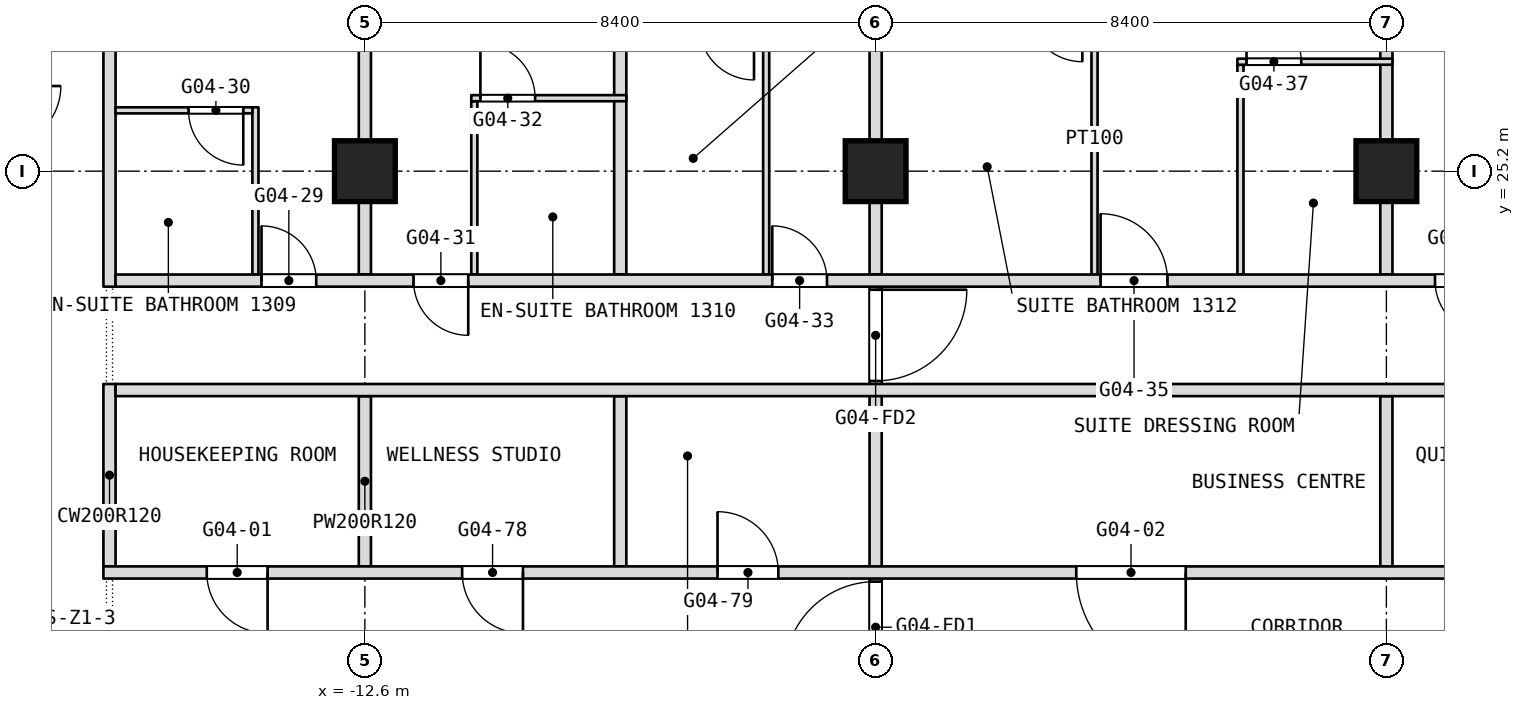
"""IFC4 building model, lengths in metres.
Left out: names, types, materials, properties, quantities, classifications, styles, units other than length and angle.
Written with IfcOpenShell. Run it as: python <this file> out.ifc"""

import sys

from ifc_helpers import new_model, si_unit, direction, frame, frame_2d, origin, origin_2d, place, context, subcontext, project, spatial, rectangle, extrude, element, fill, save


model = new_model("IFC4")
c1 = context("Model", 3, precision=1e-05, world=origin(), true_north=direction((0.0, 1.0)))
c2 = subcontext(c1, "Body", "Model", "MODEL_VIEW")
j1 = project(units=[si_unit("LENGTHUNIT", "METRE"), si_unit("PLANEANGLEUNIT", "RADIAN")], contexts=[c1])
p1 = place(None, origin())
s1 = spatial("IfcSite", under=j1, at=p1, CompositionType="ELEMENT")
p2 = place(p1, origin())
s2 = spatial("IfcBuilding", under=s1, at=p2, CompositionType="ELEMENT")
p3 = place(p2, frame((0.0, 0.0, 61.7)))
s3 = spatial("IfcBuildingStorey", under=s2, at=p3, CompositionType="ELEMENT", Elevation=61.7)
for number, where, z_axis, x_axis in (
    (1, (-12.6, 25.2, 0.0), (0.0, 0.0, 1.0), (1.0, 0.0, 0.0)),
    (2, (-4.2, 25.2, 0.0), (0.0, 0.0, 1.0), (1.0, 0.0, 0.0)),
    (3, (4.2, 25.2, 0.0), (0.0, 0.0, 1.0), (1.0, 0.0, 0.0)),
):
    element("IfcColumn", number, at=place(p3, frame(where, z_axis=z_axis, x_axis=x_axis)), inside=s3, PredefinedType="COLUMN", context=c2, shape_type="SweptSolid", body=[
        extrude(rectangle(XDim=1.0, YDim=1.0, at=origin_2d()), origin(), (0.0, 0.0, 1.0), 3.6),
    ])
p4 = place(p3, frame((4.2, 18.7, 0.0), z_axis=(0.0, 0.0, 1.0), x_axis=(0.0, 1.0, 0.0)))
e4 = element("IfcWall", 4, at=p4, inside=s3, PredefinedType="PARTITIONING", context=c2, shape_type="SweptSolid", body=[
    extrude(rectangle(XDim=2.8, YDim=0.2, at=frame_2d((1.4, 0.0))), origin(), (0.0, 0.0, 1.0), 3.34),
])
p5 = place(p3, frame((4.2, 23.5, 0.0), z_axis=(0.0, 0.0, 1.0), x_axis=(0.0, 1.0, 0.0)))
e5 = element("IfcWall", 5, at=p5, inside=s3, PredefinedType="PARTITIONING", context=c2, shape_type="SweptSolid", body=[
    extrude(rectangle(XDim=10.04, YDim=0.2, at=frame_2d((5.02, 0.0))), origin(), (0.0, 0.0, 1.0), 3.34),
])
p6 = place(p3, frame((1.8, 23.5, 0.0), z_axis=(0.0, 0.0, 1.0), x_axis=(0.0, 1.0, 0.0)))
e6 = element("IfcWall", 6, at=p6, inside=s3, PredefinedType="PARTITIONING", context=c2, shape_type="SweptSolid", body=[
    extrude(rectangle(XDim=3.45, YDim=0.1, at=frame_2d((1.725, 0.0))), origin(), (0.0, 0.0, 1.0), 3.34),
])
p7 = place(p3, frame((-0.6, 23.5, 0.0), z_axis=(0.0, 0.0, 1.0), x_axis=(0.0, 1.0, 0.0)))
e7 = element("IfcWall", 7, at=p7, inside=s3, PredefinedType="PARTITIONING", context=c2, shape_type="SweptSolid", body=[
    extrude(rectangle(XDim=4.45, YDim=0.1, at=frame_2d((2.225, 0.0))), origin(), (0.0, 0.0, 1.0), 3.34),
])
p8 = place(p3, frame((-4.2, 16.8, 0.0), z_axis=(0.0, 0.0, 1.0), x_axis=(0.0, 1.0, 0.0)))
e8 = element("IfcWall", 8, at=p8, inside=s3, PredefinedType="PARTITIONING", context=c2, shape_type="SweptSolid", body=[
    extrude(rectangle(XDim=6.7, YDim=0.2, at=frame_2d((3.35, 0.0))), origin(), (0.0, 0.0, 1.0), 3.34),
])
p9 = place(p8, frame((0.15, 0.0, 0.0)))
e9 = element("IfcOpeningElement", 9, at=p9, cuts=e8, PredefinedType="OPENING", context=c2, shape_type="SweptSolid", body=[
    extrude(rectangle(XDim=1.5, YDim=2.1, at=frame_2d((0.75, 1.05))), frame((0.0, 0.1, 0.0), z_axis=(0.0, -1.0, 0.0), x_axis=(1.0, 0.0, 0.0)), (0.0, 0.0, 1.0), 0.2),
])
p10 = place(p8, frame((4.95, 0.0, 0.0)))
e10 = element("IfcOpeningElement", 10, at=p10, cuts=e8, PredefinedType="OPENING", context=c2, shape_type="SweptSolid", body=[
    extrude(rectangle(XDim=1.5, YDim=2.1, at=frame_2d((0.75, 1.05))), frame((0.0, 0.1, 0.0), z_axis=(0.0, -1.0, 0.0), x_axis=(1.0, 0.0, 0.0)), (0.0, 0.0, 1.0), 0.2),
])
p11 = place(p3, frame((-4.2, 23.5, 0.0), z_axis=(0.0, 0.0, 1.0), x_axis=(0.0, 1.0, 0.0)))
e11 = element("IfcWall", 11, at=p11, inside=s3, PredefinedType="PARTITIONING", context=c2, shape_type="SweptSolid", body=[
    extrude(rectangle(XDim=10.04, YDim=0.2, at=frame_2d((5.02, 0.0))), origin(), (0.0, 0.0, 1.0), 3.34),
])
p12 = place(p3, frame((-6.0, 23.5, 0.0), z_axis=(0.0, 0.0, 1.0), x_axis=(0.0, 1.0, 0.0)))
e12 = element("IfcWall", 12, at=p12, inside=s3, PredefinedType="PARTITIONING", context=c2, shape_type="SweptSolid", body=[
    extrude(rectangle(XDim=4.15, YDim=0.1, at=frame_2d((2.075, 0.0))), origin(), (0.0, 0.0, 1.0), 3.34),
])
p13 = place(p3, frame((-8.4, 18.7, 0.0), z_axis=(0.0, 0.0, 1.0), x_axis=(0.0, 1.0, 0.0)))
e13 = element("IfcWall", 13, at=p13, inside=s3, PredefinedType="PARTITIONING", context=c2, shape_type="SweptSolid", body=[
    extrude(rectangle(XDim=2.8, YDim=0.2, at=frame_2d((1.4, 0.0))), origin(), (0.0, 0.0, 1.0), 3.34),
])
p14 = place(p3, frame((-8.4, 23.5, 0.0), z_axis=(0.0, 0.0, 1.0), x_axis=(0.0, 1.0, 0.0)))
e14 = element("IfcWall", 14, at=p14, inside=s3, PredefinedType="PARTITIONING", context=c2, shape_type="SweptSolid", body=[
    extrude(rectangle(XDim=10.04, YDim=0.2, at=frame_2d((5.02, 0.0))), origin(), (0.0, 0.0, 1.0), 3.34),
])
p15 = place(p3, frame((-10.8, 23.5, 0.0), z_axis=(0.0, 0.0, 1.0), x_axis=(0.0, 1.0, 0.0)))
e15 = element("IfcWall", 15, at=p15, inside=s3, PredefinedType="PARTITIONING", context=c2, shape_type="SweptSolid", body=[
    extrude(rectangle(XDim=2.85, YDim=0.1, at=frame_2d((1.425, 0.0))), origin(), (0.0, 0.0, 1.0), 3.34),
])
p16 = place(p3, frame((-12.6, 18.7, 0.0), z_axis=(0.0, 0.0, 1.0), x_axis=(0.0, 1.0, 0.0)))
e16 = element("IfcWall", 16, at=p16, inside=s3, PredefinedType="PARTITIONING", context=c2, shape_type="SweptSolid", body=[
    extrude(rectangle(XDim=2.8, YDim=0.2, at=frame_2d((1.4, 0.0))), origin(), (0.0, 0.0, 1.0), 3.34),
])
p17 = place(p3, frame((-12.6, 23.5, 0.0), z_axis=(0.0, 0.0, 1.0), x_axis=(0.0, 1.0, 0.0)))
e17 = element("IfcWall", 17, at=p17, inside=s3, PredefinedType="PARTITIONING", context=c2, shape_type="SweptSolid", body=[
    extrude(rectangle(XDim=10.04, YDim=0.2, at=frame_2d((5.02, 0.0))), origin(), (0.0, 0.0, 1.0), 3.34),
])
p18 = place(p3, frame((-14.4, 23.5, 0.0), z_axis=(0.0, 0.0, 1.0), x_axis=(0.0, 1.0, 0.0)))
e18 = element("IfcWall", 18, at=p18, inside=s3, PredefinedType="PARTITIONING", context=c2, shape_type="SweptSolid", body=[
    extrude(rectangle(XDim=2.75, YDim=0.1, at=frame_2d((1.375, 0.0))), origin(), (0.0, 0.0, 1.0), 3.34),
])
p19 = place(p3, frame((-16.8, 18.7, 0.0), z_axis=(0.0, 0.0, 1.0), x_axis=(0.0, 1.0, 0.0)))
e19 = element("IfcWall", 19, at=p19, inside=s3, PredefinedType="PARTITIONING", context=c2, shape_type="SweptSolid", body=[
    extrude(rectangle(XDim=3.0, YDim=0.2, at=frame_2d((1.5, 0.0))), origin(), (0.0, 0.0, 1.0), 3.34),
])
p20 = place(p3, frame((-16.8, 23.3, 0.0), z_axis=(0.0, 0.0, 1.0), x_axis=(0.0, 1.0, 0.0)))
e20 = element("IfcWall", 20, at=p20, inside=s3, PredefinedType="PARTITIONING", context=c2, shape_type="SweptSolid", body=[
    extrude(rectangle(XDim=10.24, YDim=0.2, at=frame_2d((5.12, 0.0))), origin(), (0.0, 0.0, 1.0), 3.34),
])
p21 = place(p3, frame((-16.9, 18.6, 0.0), z_axis=(0.0, 0.0, 1.0), x_axis=(1.0, 0.0, 0.0)))
e21 = element("IfcWall", 21, at=p21, inside=s3, PredefinedType="PARTITIONING", context=c2, shape_type="SweptSolid", body=[
    extrude(rectangle(XDim=25.1, YDim=0.2, at=frame_2d((12.55, 0.0))), origin(), (0.0, 0.0, 1.0), 3.34),
])
p22 = place(p21, frame((1.7, 0.0, 0.0)))
e22 = element("IfcOpeningElement", 22, at=p22, cuts=e21, PredefinedType="OPENING", context=c2, shape_type="SweptSolid", body=[
    extrude(rectangle(XDim=1.0, YDim=2.1, at=frame_2d((0.5, 1.05))), frame((0.0, 0.1, 0.0), z_axis=(0.0, -1.0, 0.0), x_axis=(1.0, 0.0, 0.0)), (0.0, 0.0, 1.0), 0.2),
])
p23 = place(p21, frame((16.0, 0.0, 0.0)))
e23 = element("IfcOpeningElement", 23, at=p23, cuts=e21, PredefinedType="OPENING", context=c2, shape_type="SweptSolid", body=[
    extrude(rectangle(XDim=1.8, YDim=2.1, at=frame_2d((0.9, 1.05))), frame((0.0, 0.1, 0.0), z_axis=(0.0, -1.0, 0.0), x_axis=(1.0, 0.0, 0.0)), (0.0, 0.0, 1.0), 0.2),
])
p24 = place(p21, frame((22.55, 0.0, 0.0)))
e24 = element("IfcOpeningElement", 24, at=p24, cuts=e21, PredefinedType="OPENING", context=c2, shape_type="SweptSolid", body=[
    extrude(rectangle(XDim=1.0, YDim=2.1, at=frame_2d((0.5, 1.05))), frame((0.0, 0.1, 0.0), z_axis=(0.0, -1.0, 0.0), x_axis=(1.0, 0.0, 0.0)), (0.0, 0.0, 1.0), 0.2),
])
p25 = place(p21, frame((5.9, 0.0, 0.0)))
e25 = element("IfcOpeningElement", 25, at=p25, cuts=e21, PredefinedType="OPENING", context=c2, shape_type="SweptSolid", body=[
    extrude(rectangle(XDim=1.0, YDim=2.1, at=frame_2d((0.5, 1.05))), frame((0.0, 0.1, 0.0), z_axis=(0.0, -1.0, 0.0), x_axis=(1.0, 0.0, 0.0)), (0.0, 0.0, 1.0), 0.2),
])
p26 = place(p21, frame((10.1, 0.0, 0.0)))
e26 = element("IfcOpeningElement", 26, at=p26, cuts=e21, PredefinedType="OPENING", context=c2, shape_type="SweptSolid", body=[
    extrude(rectangle(XDim=1.0, YDim=2.1, at=frame_2d((0.5, 1.05))), frame((0.0, 0.1, 0.0), z_axis=(0.0, -1.0, 0.0), x_axis=(1.0, 0.0, 0.0)), (0.0, 0.0, 1.0), 0.2),
])
p27 = place(p3, frame((-16.7, 21.6, 0.0), z_axis=(0.0, 0.0, 1.0), x_axis=(1.0, 0.0, 0.0)))
e27 = element("IfcWall", 27, at=p27, inside=s3, PredefinedType="PARTITIONING", context=c2, shape_type="SweptSolid", body=[
    extrude(rectangle(XDim=24.9, YDim=0.2, at=frame_2d((12.45, 0.0))), origin(), (0.0, 0.0, 1.0), 3.34),
])
p28 = place(p3, frame((-16.7, 23.4, 0.0), z_axis=(0.0, 0.0, 1.0), x_axis=(1.0, 0.0, 0.0)))
e28 = element("IfcWall", 28, at=p28, inside=s3, PredefinedType="PARTITIONING", context=c2, shape_type="SweptSolid", body=[
    extrude(rectangle(XDim=23.4, YDim=0.2, at=frame_2d((11.7, 0.0))), origin(), (0.0, 0.0, 1.0), 3.34),
])
p29 = place(p28, frame((2.4, 0.0, 0.0)))
e29 = element("IfcOpeningElement", 29, at=p29, cuts=e28, PredefinedType="OPENING", context=c2, shape_type="SweptSolid", body=[
    extrude(rectangle(XDim=0.9, YDim=2.1, at=frame_2d((0.45, 1.05))), frame((0.0, 0.1, 0.0), z_axis=(0.0, -1.0, 0.0), x_axis=(1.0, 0.0, 0.0)), (0.0, 0.0, 1.0), 0.2),
])
p30 = place(p28, frame((4.9, 0.0, 0.0)))
e30 = element("IfcOpeningElement", 30, at=p30, cuts=e28, PredefinedType="OPENING", context=c2, shape_type="SweptSolid", body=[
    extrude(rectangle(XDim=0.9, YDim=2.1, at=frame_2d((0.45, 1.05))), frame((0.0, 0.1, 0.0), z_axis=(0.0, -1.0, 0.0), x_axis=(1.0, 0.0, 0.0)), (0.0, 0.0, 1.0), 0.2),
])
p31 = place(p28, frame((10.8, 0.0, 0.0)))
e31 = element("IfcOpeningElement", 31, at=p31, cuts=e28, PredefinedType="OPENING", context=c2, shape_type="SweptSolid", body=[
    extrude(rectangle(XDim=0.9, YDim=2.1, at=frame_2d((0.45, 1.05))), frame((0.0, 0.1, 0.0), z_axis=(0.0, -1.0, 0.0), x_axis=(1.0, 0.0, 0.0)), (0.0, 0.0, 1.0), 0.2),
])
p32 = place(p28, frame((16.2, 0.0, 0.0)))
e32 = element("IfcOpeningElement", 32, at=p32, cuts=e28, PredefinedType="OPENING", context=c2, shape_type="SweptSolid", body=[
    extrude(rectangle(XDim=1.1, YDim=2.1, at=frame_2d((0.55, 1.05))), frame((0.0, 0.1, 0.0), z_axis=(0.0, -1.0, 0.0), x_axis=(1.0, 0.0, 0.0)), (0.0, 0.0, 1.0), 0.2),
])
p33 = place(p28, frame((21.7, 0.0, 0.0)))
e33 = element("IfcOpeningElement", 33, at=p33, cuts=e28, PredefinedType="OPENING", context=c2, shape_type="SweptSolid", body=[
    extrude(rectangle(XDim=0.9, YDim=2.1, at=frame_2d((0.45, 1.05))), frame((0.0, 0.1, 0.0), z_axis=(0.0, -1.0, 0.0), x_axis=(1.0, 0.0, 0.0)), (0.0, 0.0, 1.0), 0.2),
])
p34 = place(p3, frame((-16.7, 26.2, 0.0), z_axis=(0.0, 0.0, 1.0), x_axis=(1.0, 0.0, 0.0)))
e34 = element("IfcWall", 34, at=p34, inside=s3, PredefinedType="PARTITIONING", context=c2, shape_type="SweptSolid", body=[
    extrude(rectangle(XDim=2.25, YDim=0.1, at=frame_2d((1.125, 0.0))), origin(), (0.0, 0.0, 1.0), 3.34),
])
p35 = place(p34, frame((1.2, 0.0, 0.0)))
e35 = element("IfcOpeningElement", 35, at=p35, cuts=e34, PredefinedType="OPENING", context=c2, shape_type="SweptSolid", body=[
    extrude(rectangle(XDim=0.9, YDim=2.1, at=frame_2d((0.45, 1.05))), frame((0.0, 0.05, 0.0), z_axis=(0.0, -1.0, 0.0), x_axis=(1.0, 0.0, 0.0)), (0.0, 0.0, 1.0), 0.1),
])
p36 = place(p3, frame((-10.85, 26.4, 0.0), z_axis=(0.0, 0.0, 1.0), x_axis=(1.0, 0.0, 0.0)))
e36 = element("IfcWall", 36, at=p36, inside=s3, PredefinedType="PARTITIONING", context=c2, shape_type="SweptSolid", body=[
    extrude(rectangle(XDim=2.55, YDim=0.1, at=frame_2d((1.275, 0.0))), origin(), (0.0, 0.0, 1.0), 3.34),
])
p37 = place(p36, frame((0.15, 0.0, 0.0)))
e37 = element("IfcOpeningElement", 37, at=p37, cuts=e36, PredefinedType="OPENING", context=c2, shape_type="SweptSolid", body=[
    extrude(rectangle(XDim=0.9, YDim=2.1, at=frame_2d((0.45, 1.05))), frame((0.0, 0.05, 0.0), z_axis=(0.0, -1.0, 0.0), x_axis=(1.0, 0.0, 0.0)), (0.0, 0.0, 1.0), 0.1),
])
p38 = place(p3, frame((1.75, 27.0, 0.0), z_axis=(0.0, 0.0, 1.0), x_axis=(1.0, 0.0, 0.0)))
e38 = element("IfcWall", 38, at=p38, inside=s3, PredefinedType="PARTITIONING", context=c2, shape_type="SweptSolid", body=[
    extrude(rectangle(XDim=2.55, YDim=0.1, at=frame_2d((1.275, 0.0))), origin(), (0.0, 0.0, 1.0), 3.34),
])
p39 = place(p38, frame((0.15, 0.0, 0.0)))
e39 = element("IfcOpeningElement", 39, at=p39, cuts=e38, PredefinedType="OPENING", context=c2, shape_type="SweptSolid", body=[
    extrude(rectangle(XDim=0.9, YDim=2.1, at=frame_2d((0.45, 1.05))), frame((0.0, 0.05, 0.0), z_axis=(0.0, -1.0, 0.0), x_axis=(1.0, 0.0, 0.0)), (0.0, 0.0, 1.0), 0.1),
])
p40 = place(p22, origin())
e40 = element("IfcDoor", 40, at=p40, inside=s3, OperationType="SINGLE_SWING_RIGHT", PredefinedType="DOOR", context=c2, shape_type="SweptSolid", body=[
    extrude(rectangle(XDim=1.0, YDim=2.1, at=frame_2d((0.5, 1.05))), frame((0.0, 0.025, 0.0), z_axis=(0.0, -1.0, 0.0), x_axis=(1.0, 0.0, 0.0)), (0.0, 0.0, 1.0), 0.05),
])
fill(e22, e40)
p41 = place(p23, origin())
e41 = element("IfcDoor", 41, at=p41, inside=s3, OperationType="DOUBLE_DOOR_SINGLE_SWING", PredefinedType="DOOR", context=c2, shape_type="SweptSolid", body=[
    extrude(rectangle(XDim=1.8, YDim=2.1, at=frame_2d((0.9, 1.05))), frame((0.0, 0.025, 0.0), z_axis=(0.0, -1.0, 0.0), x_axis=(1.0, 0.0, 0.0)), (0.0, 0.0, 1.0), 0.05),
])
fill(e23, e41)
p42 = place(p25, origin())
e42 = element("IfcDoor", 42, at=p42, inside=s3, OperationType="SINGLE_SWING_RIGHT", PredefinedType="DOOR", context=c2, shape_type="SweptSolid", body=[
    extrude(rectangle(XDim=1.0, YDim=2.1, at=frame_2d((0.5, 1.05))), frame((0.0, 0.025, 0.0), z_axis=(0.0, -1.0, 0.0), x_axis=(1.0, 0.0, 0.0)), (0.0, 0.0, 1.0), 0.05),
])
fill(e25, e42)
p43 = place(p26, origin())
e43 = element("IfcDoor", 43, at=p43, inside=s3, OperationType="SINGLE_SWING_LEFT", PredefinedType="DOOR", context=c2, shape_type="SweptSolid", body=[
    extrude(rectangle(XDim=1.0, YDim=2.1, at=frame_2d((0.5, 1.05))), frame((0.0, 0.025, 0.0), z_axis=(0.0, -1.0, 0.0), x_axis=(1.0, 0.0, 0.0)), (0.0, 0.0, 1.0), 0.05),
])
fill(e26, e43)
p44 = place(p29, origin())
e44 = element("IfcDoor", 44, at=p44, inside=s3, OperationType="SINGLE_SWING_LEFT", PredefinedType="DOOR", context=c2, shape_type="SweptSolid", body=[
    extrude(rectangle(XDim=0.9, YDim=2.1, at=frame_2d((0.45, 1.05))), frame((0.0, 0.025, 0.0), z_axis=(0.0, -1.0, 0.0), x_axis=(1.0, 0.0, 0.0)), (0.0, 0.0, 1.0), 0.05),
])
fill(e29, e44)
p45 = place(p30, origin())
e45 = element("IfcDoor", 45, at=p45, inside=s3, OperationType="SINGLE_SWING_RIGHT", PredefinedType="DOOR", context=c2, shape_type="SweptSolid", body=[
    extrude(rectangle(XDim=0.9, YDim=2.1, at=frame_2d((0.45, 1.05))), frame((0.0, 0.025, 0.0), z_axis=(0.0, -1.0, 0.0), x_axis=(1.0, 0.0, 0.0)), (0.0, 0.0, 1.0), 0.05),
])
fill(e30, e45)
p46 = place(p31, origin())
e46 = element("IfcDoor", 46, at=p46, inside=s3, OperationType="SINGLE_SWING_LEFT", PredefinedType="DOOR", context=c2, shape_type="SweptSolid", body=[
    extrude(rectangle(XDim=0.9, YDim=2.1, at=frame_2d((0.45, 1.05))), frame((0.0, 0.025, 0.0), z_axis=(0.0, -1.0, 0.0), x_axis=(1.0, 0.0, 0.0)), (0.0, 0.0, 1.0), 0.05),
])
fill(e31, e46)
p47 = place(p32, origin())
e47 = element("IfcDoor", 47, at=p47, inside=s3, OperationType="SINGLE_SWING_LEFT", PredefinedType="DOOR", context=c2, shape_type="SweptSolid", body=[
    extrude(rectangle(XDim=1.1, YDim=2.1, at=frame_2d((0.55, 1.05))), frame((0.0, 0.025, 0.0), z_axis=(0.0, -1.0, 0.0), x_axis=(1.0, 0.0, 0.0)), (0.0, 0.0, 1.0), 0.05),
])
fill(e32, e47)
p48 = place(p33, origin())
e48 = element("IfcDoor", 48, at=p48, inside=s3, OperationType="SINGLE_SWING_RIGHT", PredefinedType="DOOR", context=c2, shape_type="SweptSolid", body=[
    extrude(rectangle(XDim=0.9, YDim=2.1, at=frame_2d((0.45, 1.05))), frame((0.0, 0.025, 0.0), z_axis=(0.0, -1.0, 0.0), x_axis=(1.0, 0.0, 0.0)), (0.0, 0.0, 1.0), 0.05),
])
fill(e33, e48)
p49 = place(p35, origin())
e49 = element("IfcDoor", 49, at=p49, inside=s3, OperationType="SINGLE_SWING_LEFT", PredefinedType="DOOR", context=c2, shape_type="SweptSolid", body=[
    extrude(rectangle(XDim=0.9, YDim=2.1, at=frame_2d((0.45, 1.05))), frame((0.0, 0.025, 0.0), z_axis=(0.0, -1.0, 0.0), x_axis=(1.0, 0.0, 0.0)), (0.0, 0.0, 1.0), 0.05),
])
fill(e35, e49)
p50 = place(p37, origin())
e50 = element("IfcDoor", 50, at=p50, inside=s3, OperationType="SINGLE_SWING_RIGHT", PredefinedType="DOOR", context=c2, shape_type="SweptSolid", body=[
    extrude(rectangle(XDim=0.9, YDim=2.1, at=frame_2d((0.45, 1.05))), frame((0.0, 0.025, 0.0), z_axis=(0.0, -1.0, 0.0), x_axis=(1.0, 0.0, 0.0)), (0.0, 0.0, 1.0), 0.05),
])
fill(e37, e50)
p51 = place(p39, origin())
e51 = element("IfcDoor", 51, at=p51, inside=s3, OperationType="SINGLE_SWING_RIGHT", PredefinedType="DOOR", context=c2, shape_type="SweptSolid", body=[
    extrude(rectangle(XDim=0.9, YDim=2.1, at=frame_2d((0.45, 1.05))), frame((0.0, 0.025, 0.0), z_axis=(0.0, -1.0, 0.0), x_axis=(1.0, 0.0, 0.0)), (0.0, 0.0, 1.0), 0.05),
])
fill(e39, e51)
p52 = place(p9, origin())
e52 = element("IfcDoor", 52, at=p52, inside=s3, OperationType="DOUBLE_DOOR_DOUBLE_SWING", PredefinedType="DOOR", context=c2, shape_type="SweptSolid", body=[
    extrude(rectangle(XDim=1.5, YDim=2.1, at=frame_2d((0.75, 1.05))), frame((0.0, 0.025, 0.0), z_axis=(0.0, -1.0, 0.0), x_axis=(1.0, 0.0, 0.0)), (0.0, 0.0, 1.0), 0.05),
])
fill(e9, e52)
p53 = place(p10, origin())
e53 = element("IfcDoor", 53, at=p53, inside=s3, OperationType="DOUBLE_DOOR_DOUBLE_SWING", PredefinedType="DOOR", context=c2, shape_type="SweptSolid", body=[
    extrude(rectangle(XDim=1.5, YDim=2.1, at=frame_2d((0.75, 1.05))), frame((0.0, 0.025, 0.0), z_axis=(0.0, -1.0, 0.0), x_axis=(1.0, 0.0, 0.0)), (0.0, 0.0, 1.0), 0.05),
])
fill(e10, e53)
save(model, sys.argv[1])
